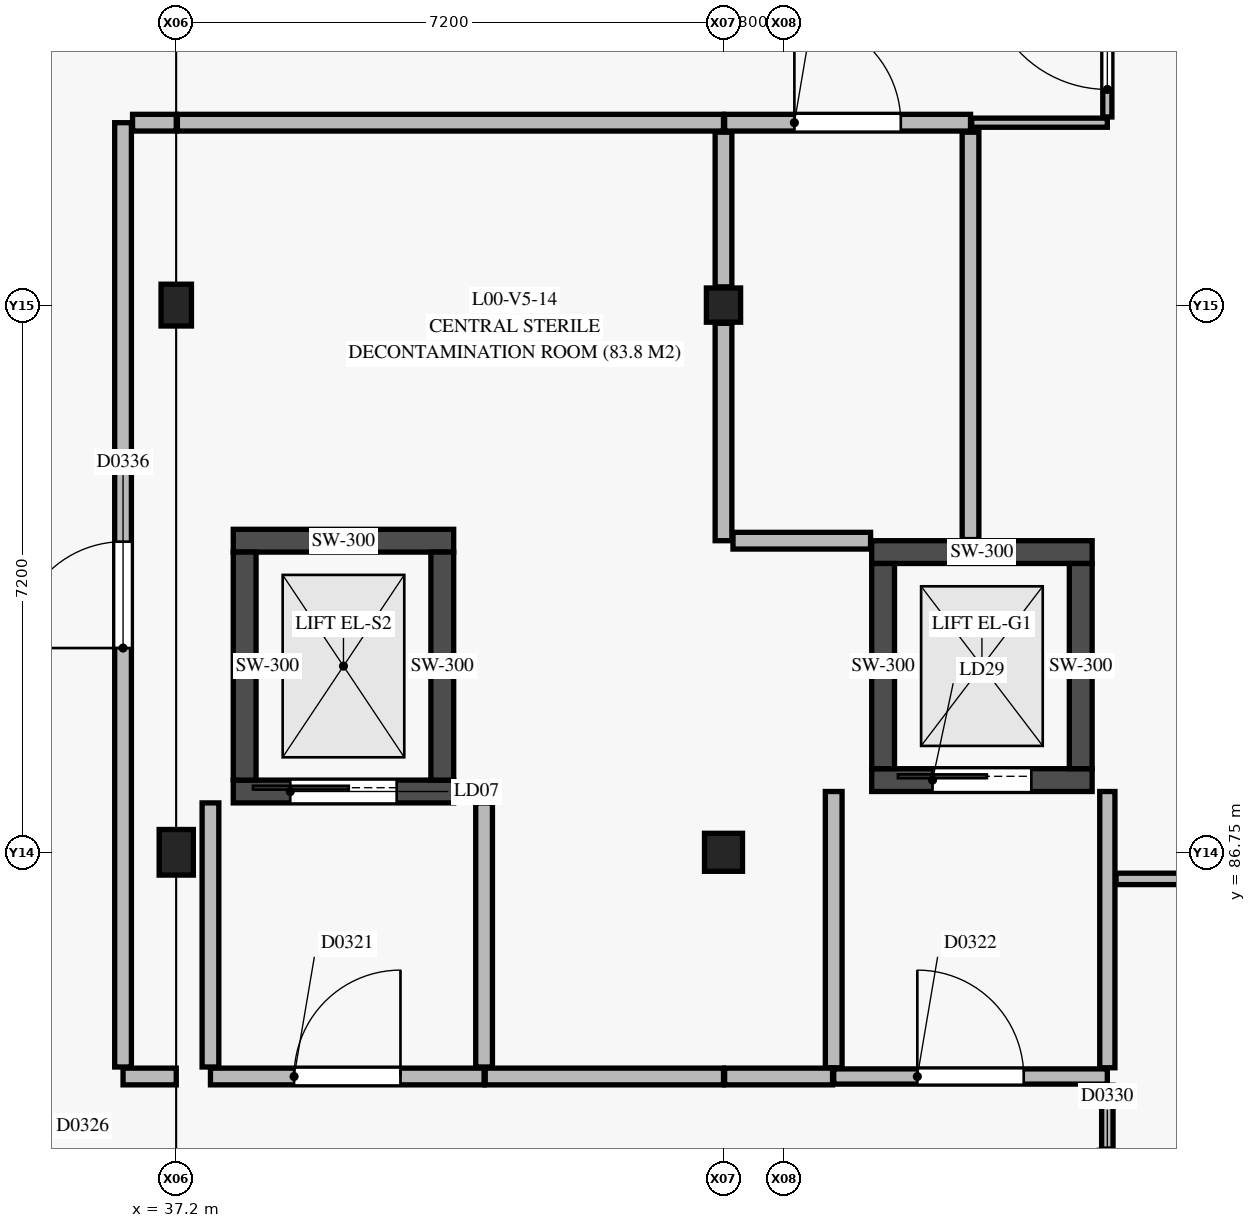
"""IFC4 building model, lengths in metres.
Left out: names, types, materials, properties, quantities, classifications, styles, units other than length and angle.
Written with IfcOpenShell. Run it as: python <this file> out.ifc"""

import sys

from ifc_helpers import new_model, si_unit, direction, frame, frame_2d, origin, origin_2d, place, context, subcontext, project, spatial, rectangle, extrude, element, fill, save


model = new_model("IFC4")
c1 = context("Model", 3, precision=1e-05, world=origin(), true_north=direction((0.0, 1.0)))
c2 = subcontext(c1, "Body", "Model", "MODEL_VIEW")
j1 = project(units=[si_unit("LENGTHUNIT", "METRE"), si_unit("PLANEANGLEUNIT", "RADIAN")], contexts=[c1])
p1 = place(None, origin())
s1 = spatial("IfcSite", under=j1, at=p1, CompositionType="ELEMENT")
p2 = place(p1, origin())
s2 = spatial("IfcBuilding", under=s1, at=p2, CompositionType="ELEMENT")
p3 = place(p2, origin())
s3 = spatial("IfcBuildingStorey", under=s2, at=p3, CompositionType="ELEMENT", Elevation=0.0)
p4 = place(p3, frame((37.2, 86.75, 0.0), z_axis=(0.0, 0.0, 1.0), x_axis=(1.0, 0.0, 0.0)))
e1 = element("IfcColumn", 1, at=p4, inside=s3, PredefinedType="COLUMN", context=c2, shape_type="SweptSolid", body=[
    extrude(rectangle(XDim=0.45, YDim=0.6, at=origin_2d()), origin(), (0.0, 0.0, 1.0), 4.8),
])
p5 = place(p3, frame((37.2, 93.95, 0.0), z_axis=(0.0, 0.0, 1.0), x_axis=(1.0, 0.0, 0.0)))
e2 = element("IfcColumn", 2, at=p5, inside=s3, PredefinedType="COLUMN", context=c2, shape_type="SweptSolid", body=[
    extrude(rectangle(XDim=0.4, YDim=0.55, at=origin_2d()), origin(), (0.0, 0.0, 1.0), 4.8),
])
p6 = place(p3, frame((44.4, 86.75, 0.0), z_axis=(0.0, 0.0, 1.0), x_axis=(1.0, 0.0, 0.0)))
e3 = element("IfcColumn", 3, at=p6, inside=s3, PredefinedType="COLUMN", context=c2, shape_type="SweptSolid", body=[
    extrude(rectangle(XDim=0.5, YDim=0.5, at=origin_2d()), origin(), (0.0, 0.0, 1.0), 4.8),
])
p7 = place(p3, frame((44.4, 93.95, 0.0), z_axis=(0.0, 0.0, 1.0), x_axis=(1.0, 0.0, 0.0)))
e4 = element("IfcColumn", 4, at=p7, inside=s3, PredefinedType="COLUMN", context=c2, shape_type="SweptSolid", body=[
    extrude(rectangle(XDim=0.45, YDim=0.45, at=origin_2d()), origin(), (0.0, 0.0, 1.0), 4.8),
])
p8 = place(p3, frame((37.95, 87.55, 0.0), z_axis=(0.0, 0.0, 1.0), x_axis=(1.0, 0.0, 0.0)))
e5 = element("IfcWall", 5, at=p8, inside=s3, PredefinedType="SHEAR", context=c2, shape_type="SweptSolid", body=[
    extrude(rectangle(XDim=2.9, YDim=0.3, at=frame_2d((1.45, 0.0))), origin(), (0.0, 0.0, 1.0), 4.52),
])
p9 = place(p8, frame((0.75, 0.0, 0.0)))
e6 = element("IfcOpeningElement", 6, at=p9, cuts=e5, PredefinedType="OPENING", context=c2, shape_type="SweptSolid", body=[
    extrude(rectangle(XDim=1.4, YDim=2.15, at=frame_2d((0.7, 1.075))), frame((0.0, 0.16, 0.0), z_axis=(0.0, -1.0, 0.0), x_axis=(1.0, 0.0, 0.0)), (0.0, 0.0, 1.0), 0.32),
])
p10 = place(p3, frame((37.95, 90.85, 0.0), z_axis=(0.0, 0.0, 1.0), x_axis=(1.0, 0.0, 0.0)))
e7 = element("IfcWall", 7, at=p10, inside=s3, PredefinedType="SHEAR", context=c2, shape_type="SweptSolid", body=[
    extrude(rectangle(XDim=2.9, YDim=0.3, at=frame_2d((1.45, 0.0))), origin(), (0.0, 0.0, 1.0), 4.52),
])
for number, where, z_axis, x_axis in (
    (8, (38.1, 87.7, 0.0), (0.0, 0.0, 1.0), (0.0, 1.0, 0.0)),
    (9, (40.7, 87.7, 0.0), (0.0, 0.0, 1.0), (0.0, 1.0, 0.0)),
):
    element("IfcWall", number, at=place(p3, frame(where, z_axis=z_axis, x_axis=x_axis)), inside=s3, PredefinedType="SHEAR", context=c2, shape_type="SweptSolid", body=[
        extrude(rectangle(XDim=3.0, YDim=0.3, at=frame_2d((1.5, 0.0))), origin(), (0.0, 0.0, 1.0), 4.52),
    ])
p11 = place(p3, frame((46.35, 87.7, 0.0), z_axis=(0.0, 0.0, 1.0), x_axis=(1.0, 0.0, 0.0)))
e10 = element("IfcWall", 10, at=p11, inside=s3, PredefinedType="SHEAR", context=c2, shape_type="SweptSolid", body=[
    extrude(rectangle(XDim=2.9, YDim=0.3, at=frame_2d((1.45, 0.0))), origin(), (0.0, 0.0, 1.0), 4.52),
])
p12 = place(p11, frame((0.8, 0.0, 0.0)))
e11 = element("IfcOpeningElement", 11, at=p12, cuts=e10, PredefinedType="OPENING", context=c2, shape_type="SweptSolid", body=[
    extrude(rectangle(XDim=1.3, YDim=2.15, at=frame_2d((0.65, 1.075))), frame((0.0, 0.16, 0.0), z_axis=(0.0, -1.0, 0.0), x_axis=(1.0, 0.0, 0.0)), (0.0, 0.0, 1.0), 0.32),
])
p13 = place(p3, frame((46.35, 90.7, 0.0), z_axis=(0.0, 0.0, 1.0), x_axis=(1.0, 0.0, 0.0)))
e12 = element("IfcWall", 12, at=p13, inside=s3, PredefinedType="SHEAR", context=c2, shape_type="SweptSolid", body=[
    extrude(rectangle(XDim=2.9, YDim=0.3, at=frame_2d((1.45, 0.0))), origin(), (0.0, 0.0, 1.0), 4.52),
])
for number, where, z_axis, x_axis in (
    (13, (46.5, 87.85, 0.0), (0.0, 0.0, 1.0), (0.0, 1.0, 0.0)),
    (14, (49.1, 87.85, 0.0), (0.0, 0.0, 1.0), (0.0, 1.0, 0.0)),
):
    element("IfcWall", number, at=place(p3, frame(where, z_axis=z_axis, x_axis=x_axis)), inside=s3, PredefinedType="SHEAR", context=c2, shape_type="SweptSolid", body=[
        extrude(rectangle(XDim=2.7, YDim=0.3, at=frame_2d((1.35, 0.0))), origin(), (0.0, 0.0, 1.0), 4.52),
    ])
p14 = place(p3, frame((37.65, 83.8, 0.0), z_axis=(0.0, 0.0, 1.0), x_axis=(1.0, 0.0, 0.0)))
e15 = element("IfcWall", 15, at=p14, inside=s3, PredefinedType="PARTITIONING", context=c2, shape_type="SweptSolid", body=[
    extrude(rectangle(XDim=3.6, YDim=0.22, at=frame_2d((1.8, 0.0))), origin(), (0.0, 0.0, 1.0), 4.52),
])
p15 = place(p14, frame((1.1, 0.0, 0.0)))
e16 = element("IfcOpeningElement", 16, at=p15, cuts=e15, PredefinedType="OPENING", context=c2, shape_type="SweptSolid", body=[
    extrude(rectangle(XDim=1.4, YDim=2.2, at=frame_2d((0.7, 1.1))), frame((0.0, 0.12, 0.0), z_axis=(0.0, -1.0, 0.0), x_axis=(1.0, 0.0, 0.0)), (0.0, 0.0, 1.0), 0.24),
])
p16 = place(p3, frame((45.85, 83.8, 0.0), z_axis=(0.0, 0.0, 1.0), x_axis=(1.0, 0.0, 0.0)))
e17 = element("IfcWall", 17, at=p16, inside=s3, PredefinedType="PARTITIONING", context=c2, shape_type="SweptSolid", body=[
    extrude(rectangle(XDim=3.6, YDim=0.2, at=frame_2d((1.8, 0.0))), origin(), (0.0, 0.0, 1.0), 4.52),
])
p17 = place(p16, frame((1.1, 0.0, 0.0)))
e18 = element("IfcOpeningElement", 18, at=p17, cuts=e17, PredefinedType="OPENING", context=c2, shape_type="SweptSolid", body=[
    extrude(rectangle(XDim=1.4, YDim=2.2, at=frame_2d((0.7, 1.1))), frame((0.0, 0.11, 0.0), z_axis=(0.0, -1.0, 0.0), x_axis=(1.0, 0.0, 0.0)), (0.0, 0.0, 1.0), 0.22),
])
for number, where, z_axis, x_axis in (
    (19, (41.25, 83.925, 0.0), (0.0, 0.0, 1.0), (0.0, 1.0, 0.0)),
    (20, (37.65, 83.925, 0.0), (0.0, 0.0, 1.0), (0.0, 1.0, 0.0)),
):
    element("IfcWall", number, at=place(p3, frame(where, z_axis=z_axis, x_axis=x_axis)), inside=s3, PredefinedType="PARTITIONING", context=c2, shape_type="SweptSolid", body=[
        extrude(rectangle(XDim=3.475, YDim=0.22, at=frame_2d((1.737, 0.0))), origin(), (0.0, 0.0, 1.0), 3.785),
    ])
p18 = place(p3, frame((45.85, 83.915, 0.0), z_axis=(0.0, 0.0, 1.0), x_axis=(0.0, 1.0, 0.0)))
e21 = element("IfcWall", 21, at=p18, inside=s3, PredefinedType="PARTITIONING", context=c2, shape_type="SweptSolid", body=[
    extrude(rectangle(XDim=3.635, YDim=0.22, at=frame_2d((1.817, 0.0))), origin(), (0.0, 0.0, 1.0), 3.855),
])
p19 = place(p3, frame((49.45, 83.915, 0.0), z_axis=(0.0, 0.0, 1.0), x_axis=(0.0, 1.0, 0.0)))
e22 = element("IfcWall", 22, at=p19, inside=s3, PredefinedType="PARTITIONING", context=c2, shape_type="SweptSolid", body=[
    extrude(rectangle(XDim=3.635, YDim=0.2, at=frame_2d((1.817, 0.0))), origin(), (0.0, 0.0, 1.0), 3.855),
])
p20 = place(p3, frame((41.265, 83.8, 0.0), z_axis=(0.0, 0.0, 1.0), x_axis=(1.0, 0.0, 0.0)))
e23 = element("IfcWall", 23, at=p20, inside=s3, PredefinedType="PARTITIONING", context=c2, shape_type="SweptSolid", body=[
    extrude(rectangle(XDim=3.135, YDim=0.22, at=frame_2d((1.567, 0.0))), origin(), (0.0, 0.0, 1.0), 3.925),
])
p21 = place(p3, frame((36.5, 83.8, 0.0), z_axis=(0.0, 0.0, 1.0), x_axis=(1.0, 0.0, 0.0)))
e24 = element("IfcWall", 24, at=p21, inside=s3, PredefinedType="PARTITIONING", context=c2, shape_type="SweptSolid", body=[
    extrude(rectangle(XDim=0.7, YDim=0.22, at=frame_2d((0.35, 0.0))), origin(), (0.0, 0.0, 1.0), 3.955),
])
p22 = place(p3, frame((36.5, 83.925, 0.0), z_axis=(0.0, 0.0, 1.0), x_axis=(0.0, 1.0, 0.0)))
e25 = element("IfcWall", 25, at=p22, inside=s3, PredefinedType="PARTITIONING", context=c2, shape_type="SweptSolid", body=[
    extrude(rectangle(XDim=12.425, YDim=0.22, at=frame_2d((6.212, 0.0))), origin(), (0.0, 0.0, 1.0), 3.925),
])
p23 = place(p22, frame((5.512, 0.0, 0.0)))
e26 = element("IfcOpeningElement", 26, at=p23, cuts=e25, PredefinedType="OPENING", context=c2, shape_type="SweptSolid", body=[
    extrude(rectangle(XDim=1.4, YDim=2.2, at=frame_2d((0.7, 1.1))), frame((0.0, 0.12, 0.0), z_axis=(0.0, -1.0, 0.0), x_axis=(1.0, 0.0, 0.0)), (0.0, 0.0, 1.0), 0.24),
])
p24 = place(p3, frame((36.625, 96.35, 0.0), z_axis=(0.0, 0.0, 1.0), x_axis=(1.0, 0.0, 0.0)))
e27 = element("IfcWall", 27, at=p24, inside=s3, PredefinedType="PARTITIONING", context=c2, shape_type="SweptSolid", body=[
    extrude(rectangle(XDim=0.575, YDim=0.22, at=frame_2d((0.288, 0.0))), origin(), (0.0, 0.0, 1.0), 3.805),
])
p25 = place(p3, frame((37.215, 96.35, 0.0), z_axis=(0.0, 0.0, 1.0), x_axis=(1.0, 0.0, 0.0)))
e28 = element("IfcWall", 28, at=p25, inside=s3, PredefinedType="PARTITIONING", context=c2, shape_type="SweptSolid", body=[
    extrude(rectangle(XDim=7.185, YDim=0.22, at=frame_2d((3.592, 0.0))), origin(), (0.0, 0.0, 1.0), 3.805),
])
p26 = place(p3, frame((44.415, 83.8, 0.0), z_axis=(0.0, 0.0, 1.0), x_axis=(1.0, 0.0, 0.0)))
e29 = element("IfcWall", 29, at=p26, inside=s3, PredefinedType="PARTITIONING", context=c2, shape_type="SweptSolid", body=[
    extrude(rectangle(XDim=1.42, YDim=0.22, at=frame_2d((0.71, 0.0))), origin(), (0.0, 0.0, 1.0), 3.925),
])
p27 = place(p3, frame((44.415, 96.35, 0.0), z_axis=(0.0, 0.0, 1.0), x_axis=(1.0, 0.0, 0.0)))
e30 = element("IfcWall", 30, at=p27, inside=s3, PredefinedType="PARTITIONING", context=c2, shape_type="SweptSolid", body=[
    extrude(rectangle(XDim=3.235, YDim=0.22, at=frame_2d((1.617, 0.0))), origin(), (0.0, 0.0, 1.0), 3.955),
])
p28 = place(p27, frame((0.917, 0.0, 0.0)))
e31 = element("IfcOpeningElement", 31, at=p28, cuts=e30, PredefinedType="OPENING", context=c2, shape_type="SweptSolid", body=[
    extrude(rectangle(XDim=1.4, YDim=2.2, at=frame_2d((0.7, 1.1))), frame((0.0, 0.12, 0.0), z_axis=(0.0, -1.0, 0.0), x_axis=(1.0, 0.0, 0.0)), (0.0, 0.0, 1.0), 0.24),
])
p29 = place(p3, frame((49.45, 81.49, 0.0), z_axis=(0.0, 0.0, 1.0), x_axis=(0.0, 1.0, 0.0)))
e32 = element("IfcWall", 32, at=p29, inside=s3, PredefinedType="PARTITIONING", context=c2, shape_type="SweptSolid", body=[
    extrude(rectangle(XDim=2.195, YDim=0.15, at=frame_2d((1.098, 0.0))), origin(), (0.0, 0.0, 1.0), 4.045),
])
p30 = place(p29, frame((0.423, 0.0, 0.0)))
e33 = element("IfcOpeningElement", 33, at=p30, cuts=e32, PredefinedType="OPENING", context=c2, shape_type="SweptSolid", body=[
    extrude(rectangle(XDim=0.95, YDim=2.1, at=frame_2d((0.475, 1.05))), frame((0.0, 0.085, 0.0), z_axis=(0.0, -1.0, 0.0), x_axis=(1.0, 0.0, 0.0)), (0.0, 0.0, 1.0), 0.17),
])
p31 = place(p3, frame((47.665, 96.35, 0.0), z_axis=(0.0, 0.0, 1.0), x_axis=(1.0, 0.0, 0.0)))
e34 = element("IfcWall", 34, at=p31, inside=s3, PredefinedType="PARTITIONING", context=c2, shape_type="SweptSolid", body=[
    extrude(rectangle(XDim=1.785, YDim=0.12, at=frame_2d((0.893, 0.0))), origin(), (0.0, 0.0, 1.0), 4.045),
])
p32 = place(p3, frame((49.45, 96.425, 0.0), z_axis=(0.0, 0.0, 1.0), x_axis=(0.0, 1.0, 0.0)))
e35 = element("IfcWall", 35, at=p32, inside=s3, PredefinedType="PARTITIONING", context=c2, shape_type="SweptSolid", body=[
    extrude(rectangle(XDim=2.325, YDim=0.12, at=frame_2d((1.163, 0.0))), origin(), (0.0, 0.0, 1.0), 4.085),
])
p33 = place(p32, frame((0.363, 0.0, 0.0)))
e36 = element("IfcOpeningElement", 36, at=p33, cuts=e35, PredefinedType="OPENING", context=c2, shape_type="SweptSolid", body=[
    extrude(rectangle(XDim=1.6, YDim=2.25, at=frame_2d((0.8, 1.125))), frame((0.0, 0.07, 0.0), z_axis=(0.0, -1.0, 0.0), x_axis=(1.0, 0.0, 0.0)), (0.0, 0.0, 1.0), 0.14),
])
p34 = place(p3, frame((44.4, 90.85, 0.0), z_axis=(0.0, 0.0, 1.0), x_axis=(0.0, 1.0, 0.0)))
e37 = element("IfcWall", 37, at=p34, inside=s3, PredefinedType="PARTITIONING", context=c2, shape_type="SweptSolid", body=[
    extrude(rectangle(XDim=2.86, YDim=0.22, at=frame_2d((1.43, 0.0))), origin(), (0.0, 0.0, 1.0), 3.925),
])
p35 = place(p3, frame((44.4, 94.19, 0.0), z_axis=(0.0, 0.0, 1.0), x_axis=(0.0, 1.0, 0.0)))
e38 = element("IfcWall", 38, at=p35, inside=s3, PredefinedType="PARTITIONING", context=c2, shape_type="SweptSolid", body=[
    extrude(rectangle(XDim=2.035, YDim=0.22, at=frame_2d((1.018, 0.0))), origin(), (0.0, 0.0, 1.0), 3.955),
])
p36 = place(p3, frame((44.525, 90.85, 0.0), z_axis=(0.0, 0.0, 1.0), x_axis=(1.0, 0.0, 0.0)))
e39 = element("IfcWall", 39, at=p36, inside=s3, PredefinedType="PARTITIONING", context=c2, shape_type="SweptSolid", body=[
    extrude(rectangle(XDim=1.81, YDim=0.22, at=frame_2d((0.905, 0.0))), origin(), (0.0, 0.0, 1.0), 4.52),
])
p37 = place(p3, frame((47.65, 90.865, 0.0), z_axis=(0.0, 0.0, 1.0), x_axis=(0.0, 1.0, 0.0)))
e40 = element("IfcWall", 40, at=p37, inside=s3, PredefinedType="PARTITIONING", context=c2, shape_type="SweptSolid", body=[
    extrude(rectangle(XDim=5.36, YDim=0.22, at=frame_2d((2.68, 0.0))), origin(), (0.0, 0.0, 1.0), 3.955),
])
p38 = place(p3, frame((49.565, 86.4, 0.0), z_axis=(0.0, 0.0, 1.0), x_axis=(1.0, 0.0, 0.0)))
e41 = element("IfcWall", 41, at=p38, inside=s3, PredefinedType="PARTITIONING", context=c2, shape_type="SweptSolid", body=[
    extrude(rectangle(XDim=1.72, YDim=0.15, at=frame_2d((0.86, 0.0))), origin(), (0.0, 0.0, 1.0), 4.52),
])
p39 = place(p9, origin())
e42 = element("IfcDoor", 42, at=p39, inside=s3, OperationType="SLIDING_TO_LEFT", PredefinedType="DOOR", context=c2, shape_type="SweptSolid", body=[
    extrude(rectangle(XDim=1.4, YDim=2.15, at=frame_2d((0.7, 1.075))), frame((0.0, 0.025, 0.0), z_axis=(0.0, -1.0, 0.0), x_axis=(1.0, 0.0, 0.0)), (0.0, 0.0, 1.0), 0.05),
])
fill(e6, e42)
p40 = place(p12, origin())
e43 = element("IfcDoor", 43, at=p40, inside=s3, OperationType="SLIDING_TO_LEFT", PredefinedType="DOOR", context=c2, shape_type="SweptSolid", body=[
    extrude(rectangle(XDim=1.3, YDim=2.15, at=frame_2d((0.65, 1.075))), frame((0.0, 0.025, 0.0), z_axis=(0.0, -1.0, 0.0), x_axis=(1.0, 0.0, 0.0)), (0.0, 0.0, 1.0), 0.05),
])
fill(e11, e43)
p41 = place(p15, origin())
e44 = element("IfcDoor", 44, at=p41, inside=s3, OperationType="SINGLE_SWING_RIGHT", PredefinedType="DOOR", context=c2, shape_type="SweptSolid", body=[
    extrude(rectangle(XDim=1.4, YDim=2.2, at=frame_2d((0.7, 1.1))), frame((0.0, 0.025, 0.0), z_axis=(0.0, -1.0, 0.0), x_axis=(1.0, 0.0, 0.0)), (0.0, 0.0, 1.0), 0.05),
])
fill(e16, e44)
p42 = place(p17, origin())
e45 = element("IfcDoor", 45, at=p42, inside=s3, OperationType="SINGLE_SWING_LEFT", PredefinedType="DOOR", context=c2, shape_type="SweptSolid", body=[
    extrude(rectangle(XDim=1.4, YDim=2.2, at=frame_2d((0.7, 1.1))), frame((0.0, 0.025, 0.0), z_axis=(0.0, -1.0, 0.0), x_axis=(1.0, 0.0, 0.0)), (0.0, 0.0, 1.0), 0.05),
])
fill(e18, e45)
p43 = place(p23, origin())
e46 = element("IfcDoor", 46, at=p43, inside=s3, OperationType="SINGLE_SWING_LEFT", PredefinedType="DOOR", context=c2, shape_type="SweptSolid", body=[
    extrude(rectangle(XDim=1.4, YDim=2.2, at=frame_2d((0.7, 1.1))), frame((0.0, 0.025, 0.0), z_axis=(0.0, -1.0, 0.0), x_axis=(1.0, 0.0, 0.0)), (0.0, 0.0, 1.0), 0.05),
])
fill(e26, e46)
p44 = place(p33, origin())
e47 = element("IfcDoor", 47, at=p44, inside=s3, OperationType="SINGLE_SWING_RIGHT", PredefinedType="DOOR", context=c2, shape_type="SweptSolid", body=[
    extrude(rectangle(XDim=1.6, YDim=2.25, at=frame_2d((0.8, 1.125))), frame((0.0, 0.025, 0.0), z_axis=(0.0, -1.0, 0.0), x_axis=(1.0, 0.0, 0.0)), (0.0, 0.0, 1.0), 0.05),
])
fill(e36, e47)
p45 = place(p28, origin())
e48 = element("IfcDoor", 48, at=p45, inside=s3, OperationType="SINGLE_SWING_LEFT", PredefinedType="DOOR", context=c2, shape_type="SweptSolid", body=[
    extrude(rectangle(XDim=1.4, YDim=2.2, at=frame_2d((0.7, 1.1))), frame((0.0, 0.025, 0.0), z_axis=(0.0, -1.0, 0.0), x_axis=(1.0, 0.0, 0.0)), (0.0, 0.0, 1.0), 0.05),
])
fill(e31, e48)
save(model, sys.argv[1])
